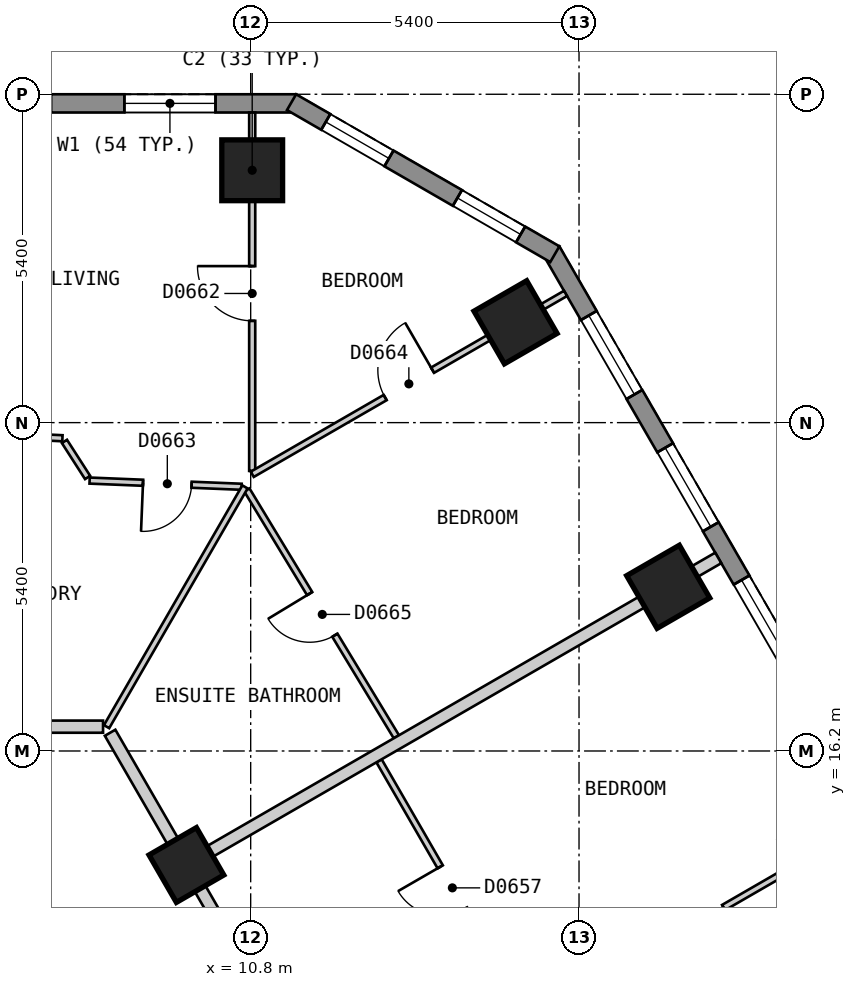
"""IFC4 building model, lengths in metres.
Left out: names, types, materials, properties, quantities, classifications, styles, units other than length and angle.
Written with IfcOpenShell. Run it as: python <this file> out.ifc"""

import sys

from ifc_helpers import new_model, si_unit, direction, frame, frame_2d, origin, origin_2d, place, context, subcontext, project, spatial, polyline, rectangle, outline, extrude, element, fill, save


model = new_model("IFC4")
c1 = context("Model", 3, precision=1e-05, world=origin(), true_north=direction((0.0, 1.0)))
c2 = subcontext(c1, "Body", "Model", "MODEL_VIEW")
j1 = project(units=[si_unit("LENGTHUNIT", "METRE"), si_unit("PLANEANGLEUNIT", "RADIAN")], contexts=[c1])
p1 = place(None, origin())
s1 = spatial("IfcSite", under=j1, at=p1, CompositionType="ELEMENT")
p2 = place(p1, origin())
s2 = spatial("IfcBuilding", under=s1, at=p2, CompositionType="ELEMENT")
p3 = place(p2, frame((0.0, 0.0, 75.0)))
s3 = spatial("IfcBuildingStorey", under=s2, at=p3, CompositionType="ELEMENT", Elevation=75.0)
for number, where, z_axis, x_axis in (
    (1, (10.825, 25.75, 0.0), (0.0, 0.0, 1.0), (-1.0, 0.0, 0.0)),
    (2, (17.667, 18.9, 0.0), (0.0, 0.0, 1.0), (-0.5, 0.866, 0.0)),
    (3, (15.156, 23.25, 0.0), (0.0, 0.0, 1.0), (-0.5, 0.866, 0.0)),
):
    element("IfcColumn", number, at=place(p3, frame(where, z_axis=z_axis, x_axis=x_axis)), inside=s3, PredefinedType="COLUMN", context=c2, shape_type="SweptSolid", body=[
        extrude(rectangle(XDim=1.0, YDim=1.0, at=origin_2d()), origin(), (0.0, 0.0, 1.0), 3.0),
    ])
p4 = place(p3, frame((9.743, 14.325, 0.0), z_axis=(0.0, 0.0, 1.0), x_axis=(-0.5, 0.866025403784, 0.0)))
e4 = element("IfcColumn", 4, at=p4, inside=s3, PredefinedType="COLUMN", context=c2, shape_type="SweptSolid", body=[
    extrude(rectangle(XDim=0.9, YDim=0.9, at=origin_2d()), origin(), (0.0, 0.0, 1.0), 3.0),
])
p5 = place(p3, frame((11.547, 26.85, 0.0), z_axis=(0.0, 0.0, 1.0), x_axis=(-1.0, 0.0, 0.0)))
e5 = element("IfcWall", 5, at=p5, inside=s3, PredefinedType="SOLIDWALL", context=c2, shape_type="SweptSolid", body=[
    extrude(outline(polyline([(0.0, -0.15), (23.094, -0.15), (23.014, 0.15), (0.08, 0.15), (0.0, -0.15)])), origin(), (0.0, 0.0, 1.0), 2.7),
])
p6 = place(p5, frame((1.325, 0.0, 0.15)))
e6 = element("IfcOpeningElement", 6, at=p6, cuts=e5, PredefinedType="OPENING", context=c2, shape_type="SweptSolid", body=[
    extrude(rectangle(XDim=1.5, YDim=2.1, at=frame_2d((0.75, 1.05))), frame((0.0, 0.16, 0.0), z_axis=(0.0, -1.0, 0.0), x_axis=(1.0, 0.0, 0.0)), (0.0, 0.0, 1.0), 0.32),
])
p7 = place(p5, frame((4.032, 0.0, 0.15)))
e7 = element("IfcOpeningElement", 7, at=p7, cuts=e5, PredefinedType="OPENING", context=c2, shape_type="SweptSolid", body=[
    extrude(rectangle(XDim=1.5, YDim=2.1, at=frame_2d((0.75, 1.05))), frame((0.0, 0.16, 0.0), z_axis=(0.0, -1.0, 0.0), x_axis=(1.0, 0.0, 0.0)), (0.0, 0.0, 1.0), 0.32),
])
p8 = place(p5, frame((6.738, 0.0, 0.15)))
e8 = element("IfcOpeningElement", 8, at=p8, cuts=e5, PredefinedType="OPENING", context=c2, shape_type="SweptSolid", body=[
    extrude(rectangle(XDim=1.5, YDim=2.1, at=frame_2d((0.75, 1.05))), frame((0.0, 0.16, 0.0), z_axis=(0.0, -1.0, 0.0), x_axis=(1.0, 0.0, 0.0)), (0.0, 0.0, 1.0), 0.32),
])
p9 = place(p5, frame((9.445, 0.0, 0.15)))
e9 = element("IfcOpeningElement", 9, at=p9, cuts=e5, PredefinedType="OPENING", context=c2, shape_type="SweptSolid", body=[
    extrude(rectangle(XDim=1.5, YDim=2.1, at=frame_2d((0.75, 1.05))), frame((0.0, 0.16, 0.0), z_axis=(0.0, -1.0, 0.0), x_axis=(1.0, 0.0, 0.0)), (0.0, 0.0, 1.0), 0.32),
])
p10 = place(p5, frame((12.151, 0.0, 0.15)))
e10 = element("IfcOpeningElement", 10, at=p10, cuts=e5, PredefinedType="OPENING", context=c2, shape_type="SweptSolid", body=[
    extrude(rectangle(XDim=1.5, YDim=2.1, at=frame_2d((0.75, 1.05))), frame((0.0, 0.16, 0.0), z_axis=(0.0, -1.0, 0.0), x_axis=(1.0, 0.0, 0.0)), (0.0, 0.0, 1.0), 0.32),
])
p11 = place(p5, frame((14.858, 0.0, 0.15)))
e11 = element("IfcOpeningElement", 11, at=p11, cuts=e5, PredefinedType="OPENING", context=c2, shape_type="SweptSolid", body=[
    extrude(rectangle(XDim=1.5, YDim=2.1, at=frame_2d((0.75, 1.05))), frame((0.0, 0.16, 0.0), z_axis=(0.0, -1.0, 0.0), x_axis=(1.0, 0.0, 0.0)), (0.0, 0.0, 1.0), 0.32),
])
p12 = place(p5, frame((17.564, 0.0, 0.15)))
e12 = element("IfcOpeningElement", 12, at=p12, cuts=e5, PredefinedType="OPENING", context=c2, shape_type="SweptSolid", body=[
    extrude(rectangle(XDim=1.5, YDim=2.1, at=frame_2d((0.75, 1.05))), frame((0.0, 0.16, 0.0), z_axis=(0.0, -1.0, 0.0), x_axis=(1.0, 0.0, 0.0)), (0.0, 0.0, 1.0), 0.32),
])
p13 = place(p5, frame((20.271, 0.0, 0.15)))
e13 = element("IfcOpeningElement", 13, at=p13, cuts=e5, PredefinedType="OPENING", context=c2, shape_type="SweptSolid", body=[
    extrude(rectangle(XDim=1.5, YDim=2.1, at=frame_2d((0.75, 1.05))), frame((0.0, 0.16, 0.0), z_axis=(0.0, -1.0, 0.0), x_axis=(1.0, 0.0, 0.0)), (0.0, 0.0, 1.0), 0.32),
])
p14 = place(p3, frame((29.027, 1.425, 0.0), z_axis=(0.0, 0.0, 1.0), x_axis=(-0.500027479704, 0.866009537788, 0.0)))
e14 = element("IfcWall", 14, at=p14, inside=s3, PredefinedType="SOLIDWALL", context=c2, shape_type="SweptSolid", body=[
    extrude(outline(polyline([(0.0, -0.15), (26.559, -0.15), (26.478, 0.15), (0.08, 0.15), (0.0, -0.15)])), origin(), (0.0, 0.0, 1.0), 2.7),
])
p15 = place(p14, frame((1.227, 0.0, 0.15)))
e15 = element("IfcOpeningElement", 15, at=p15, cuts=e14, PredefinedType="OPENING", context=c2, shape_type="SweptSolid", body=[
    extrude(rectangle(XDim=1.5, YDim=2.1, at=frame_2d((0.75, 1.05))), frame((0.0, 0.16, 0.0), z_axis=(0.0, -1.0, 0.0), x_axis=(1.0, 0.0, 0.0)), (0.0, 0.0, 1.0), 0.32),
])
p16 = place(p14, frame((3.738, 0.0, 0.15)))
e16 = element("IfcOpeningElement", 16, at=p16, cuts=e14, PredefinedType="OPENING", context=c2, shape_type="SweptSolid", body=[
    extrude(rectangle(XDim=1.5, YDim=2.1, at=frame_2d((0.75, 1.05))), frame((0.0, 0.16, 0.0), z_axis=(0.0, -1.0, 0.0), x_axis=(1.0, 0.0, 0.0)), (0.0, 0.0, 1.0), 0.32),
])
p17 = place(p14, frame((6.25, 0.0, 0.15)))
e17 = element("IfcOpeningElement", 17, at=p17, cuts=e14, PredefinedType="OPENING", context=c2, shape_type="SweptSolid", body=[
    extrude(rectangle(XDim=1.5, YDim=2.1, at=frame_2d((0.75, 1.05))), frame((0.0, 0.16, 0.0), z_axis=(0.0, -1.0, 0.0), x_axis=(1.0, 0.0, 0.0)), (0.0, 0.0, 1.0), 0.32),
])
p18 = place(p14, frame((8.761, 0.0, 0.15)))
e18 = element("IfcOpeningElement", 18, at=p18, cuts=e14, PredefinedType="OPENING", context=c2, shape_type="SweptSolid", body=[
    extrude(rectangle(XDim=1.5, YDim=2.1, at=frame_2d((0.75, 1.05))), frame((0.0, 0.16, 0.0), z_axis=(0.0, -1.0, 0.0), x_axis=(1.0, 0.0, 0.0)), (0.0, 0.0, 1.0), 0.32),
])
p19 = place(p14, frame((11.273, 0.0, 0.15)))
e19 = element("IfcOpeningElement", 19, at=p19, cuts=e14, PredefinedType="OPENING", context=c2, shape_type="SweptSolid", body=[
    extrude(rectangle(XDim=1.5, YDim=2.1, at=frame_2d((0.75, 1.05))), frame((0.0, 0.16, 0.0), z_axis=(0.0, -1.0, 0.0), x_axis=(1.0, 0.0, 0.0)), (0.0, 0.0, 1.0), 0.32),
])
p20 = place(p14, frame((13.785, 0.0, 0.15)))
e20 = element("IfcOpeningElement", 20, at=p20, cuts=e14, PredefinedType="OPENING", context=c2, shape_type="SweptSolid", body=[
    extrude(rectangle(XDim=1.5, YDim=2.1, at=frame_2d((0.75, 1.05))), frame((0.0, 0.16, 0.0), z_axis=(0.0, -1.0, 0.0), x_axis=(1.0, 0.0, 0.0)), (0.0, 0.0, 1.0), 0.32),
])
p21 = place(p14, frame((16.296, 0.0, 0.15)))
e21 = element("IfcOpeningElement", 21, at=p21, cuts=e14, PredefinedType="OPENING", context=c2, shape_type="SweptSolid", body=[
    extrude(rectangle(XDim=1.5, YDim=2.1, at=frame_2d((0.75, 1.05))), frame((0.0, 0.16, 0.0), z_axis=(0.0, -1.0, 0.0), x_axis=(1.0, 0.0, 0.0)), (0.0, 0.0, 1.0), 0.32),
])
p22 = place(p14, frame((18.807, 0.0, 0.15)))
e22 = element("IfcOpeningElement", 22, at=p22, cuts=e14, PredefinedType="OPENING", context=c2, shape_type="SweptSolid", body=[
    extrude(rectangle(XDim=1.5, YDim=2.1, at=frame_2d((0.75, 1.05))), frame((0.0, 0.16, 0.0), z_axis=(0.0, -1.0, 0.0), x_axis=(1.0, 0.0, 0.0)), (0.0, 0.0, 1.0), 0.32),
])
p23 = place(p14, frame((21.319, 0.0, 0.15)))
e23 = element("IfcOpeningElement", 23, at=p23, cuts=e14, PredefinedType="OPENING", context=c2, shape_type="SweptSolid", body=[
    extrude(rectangle(XDim=1.5, YDim=2.1, at=frame_2d((0.75, 1.05))), frame((0.0, 0.16, 0.0), z_axis=(0.0, -1.0, 0.0), x_axis=(1.0, 0.0, 0.0)), (0.0, 0.0, 1.0), 0.32),
])
p24 = place(p14, frame((23.831, 0.0, 0.15)))
e24 = element("IfcOpeningElement", 24, at=p24, cuts=e14, PredefinedType="OPENING", context=c2, shape_type="SweptSolid", body=[
    extrude(rectangle(XDim=1.5, YDim=2.1, at=frame_2d((0.75, 1.05))), frame((0.0, 0.16, 0.0), z_axis=(0.0, -1.0, 0.0), x_axis=(1.0, 0.0, 0.0)), (0.0, 0.0, 1.0), 0.32),
])
p25 = place(p3, frame((15.802, 24.37, 0.0), z_axis=(0.0, 0.0, 1.0), x_axis=(-0.866022959057, 0.500004234368, 0.0)))
e25 = element("IfcWall", 25, at=p25, inside=s3, PredefinedType="SOLIDWALL", context=c2, shape_type="SweptSolid", body=[
    extrude(outline(polyline([(0.0, -0.15), (5.0, -0.15), (4.92, 0.15), (0.08, 0.15), (0.0, -0.15)])), origin(), (0.0, 0.0, 1.0), 2.7),
])
p26 = place(p25, frame((0.65, 0.0, 0.15)))
e26 = element("IfcOpeningElement", 26, at=p26, cuts=e25, PredefinedType="OPENING", context=c2, shape_type="SweptSolid", body=[
    extrude(rectangle(XDim=1.2, YDim=2.1, at=frame_2d((0.6, 1.05))), frame((0.0, 0.16, 0.0), z_axis=(0.0, -1.0, 0.0), x_axis=(1.0, 0.0, 0.0)), (0.0, 0.0, 1.0), 0.32),
])
p27 = place(p25, frame((3.15, 0.0, 0.15)))
e27 = element("IfcOpeningElement", 27, at=p27, cuts=e25, PredefinedType="OPENING", context=c2, shape_type="SweptSolid", body=[
    extrude(rectangle(XDim=1.2, YDim=2.1, at=frame_2d((0.6, 1.05))), frame((0.0, 0.16, 0.0), z_axis=(0.0, -1.0, 0.0), x_axis=(1.0, 0.0, 0.0)), (0.0, 0.0, 1.0), 0.32),
])
p28 = place(p3, frame((8.488, 16.5, 0.0), z_axis=(0.0, 0.0, 1.0), x_axis=(0.499986836607, -0.86603300354, 0.0)))
e28 = element("IfcWall", 28, at=p28, inside=s3, PredefinedType="PARTITIONING", context=c2, shape_type="SweptSolid", body=[
    extrude(rectangle(XDim=20.09, YDim=0.2, at=frame_2d((10.045, 0.0))), origin(), (0.0, 0.0, 1.0), 2.7),
])
p29 = place(p28, frame((14.569, 0.0, 0.0)))
e29 = element("IfcOpeningElement", 29, at=p29, cuts=e28, PredefinedType="OPENING", context=c2, shape_type="SweptSolid", body=[
    extrude(rectangle(XDim=1.0, YDim=2.1, at=frame_2d((0.5, 1.05))), frame((0.0, 0.11, 0.0), z_axis=(0.0, -1.0, 0.0), x_axis=(1.0, 0.0, 0.0)), (0.0, 0.0, 1.0), 0.22),
])
p30 = place(p3, frame((5.889, 16.6, 0.0), z_axis=(0.0, 0.0, 1.0), x_axis=(1.0, 0.0, 0.0)))
e30 = element("IfcWall", 30, at=p30, inside=s3, PredefinedType="PARTITIONING", context=c2, shape_type="SweptSolid", body=[
    extrude(rectangle(XDim=2.483, YDim=0.2, at=frame_2d((1.242, 0.0))), origin(), (0.0, 0.0, 1.0), 2.7),
])
p31 = place(p3, frame((7.737, 21.291, 0.0), z_axis=(0.0, 0.0, 1.0), x_axis=(0.540389876456, -0.841414749944, 0.0)))
e31 = element("IfcWall", 31, at=p31, inside=s3, PredefinedType="PARTITIONING", context=c2, shape_type="SweptSolid", body=[
    extrude(rectangle(XDim=0.705, YDim=0.1, at=frame_2d((0.353, 0.0))), origin(), (0.0, 0.0, 1.0), 2.7),
])
p32 = place(p3, frame((10.738, 20.492, 0.0), z_axis=(0.0, 0.0, 1.0), x_axis=(0.518100976056, -0.855319459974, 0.0)))
e32 = element("IfcWall", 32, at=p32, inside=s3, PredefinedType="PARTITIONING", context=c2, shape_type="SweptSolid", body=[
    extrude(rectangle(XDim=4.744, YDim=0.1, at=frame_2d((2.372, 0.0))), origin(), (0.0, 0.0, 1.0), 2.7),
])
p33 = place(p32, frame((1.992, 0.0, 0.0)))
e33 = element("IfcOpeningElement", 33, at=p33, cuts=e32, PredefinedType="OPENING", context=c2, shape_type="SweptSolid", body=[
    extrude(rectangle(XDim=0.8, YDim=2.1, at=frame_2d((0.4, 1.05))), frame((0.0, 0.06, 0.0), z_axis=(0.0, -1.0, 0.0), x_axis=(1.0, 0.0, 0.0)), (0.0, 0.0, 1.0), 0.12),
])
p34 = place(p3, frame((12.911, 16.038, 0.0), z_axis=(0.0, 0.0, 1.0), x_axis=(0.499974319101, -0.866040230151, 0.0)))
e34 = element("IfcWall", 34, at=p34, inside=s3, PredefinedType="PARTITIONING", context=c2, shape_type="SweptSolid", body=[
    extrude(rectangle(XDim=4.923, YDim=0.1, at=frame_2d((2.461, 0.0))), origin(), (0.0, 0.0, 1.0), 2.7),
])
p35 = place(p34, frame((2.012, 0.0, 0.0)))
e35 = element("IfcOpeningElement", 35, at=p35, cuts=e34, PredefinedType="OPENING", context=c2, shape_type="SweptSolid", body=[
    extrude(rectangle(XDim=0.8, YDim=2.1, at=frame_2d((0.4, 1.05))), frame((0.0, 0.06, 0.0), z_axis=(0.0, -1.0, 0.0), x_axis=(1.0, 0.0, 0.0)), (0.0, 0.0, 1.0), 0.12),
])
p36 = place(p3, frame((8.151, 20.647, 0.0), z_axis=(0.0, 0.0, 1.0), x_axis=(0.999167241152, -0.040802257405, 0.0)))
e36 = element("IfcWall", 36, at=p36, inside=s3, PredefinedType="PARTITIONING", context=c2, shape_type="SweptSolid", body=[
    extrude(rectangle(XDim=2.501, YDim=0.1, at=frame_2d((1.25, 0.0))), origin(), (0.0, 0.0, 1.0), 2.7),
])
p37 = place(p36, frame((0.879, 0.0, 0.0)))
e37 = element("IfcOpeningElement", 37, at=p37, cuts=e36, PredefinedType="OPENING", context=c2, shape_type="SweptSolid", body=[
    extrude(rectangle(XDim=0.8, YDim=2.1, at=frame_2d((0.4, 1.05))), frame((0.0, 0.06, 0.0), z_axis=(0.0, -1.0, 0.0), x_axis=(1.0, 0.0, 0.0)), (0.0, 0.0, 1.0), 0.12),
])
p38 = place(p3, frame((5.649, 21.441, 0.0), z_axis=(0.0, 0.0, 1.0), x_axis=(0.998867332207, -0.047582062273, 0.0)))
e38 = element("IfcWall", 38, at=p38, inside=s3, PredefinedType="PARTITIONING", context=c2, shape_type="SweptSolid", body=[
    extrude(rectangle(XDim=2.058, YDim=0.1, at=frame_2d((1.029, 0.0))), origin(), (0.0, 0.0, 1.0), 2.7),
])
p39 = place(p3, frame((8.43, 16.6, 0.0), z_axis=(0.0, 0.0, 1.0), x_axis=(0.499951460778, 0.866053426104, 0.0)))
e39 = element("IfcWall", 39, at=p39, inside=s3, PredefinedType="PARTITIONING", context=c2, shape_type="SweptSolid", body=[
    extrude(rectangle(XDim=4.553, YDim=0.1, at=frame_2d((2.276, 0.0))), origin(), (0.0, 0.0, 1.0), 2.7),
])
p40 = place(p3, frame((10.825, 20.806, 0.0), z_axis=(0.0, 0.0, 1.0), x_axis=(0.0, 1.0, 0.0)))
e40 = element("IfcWall", 40, at=p40, inside=s3, PredefinedType="PARTITIONING", context=c2, shape_type="SweptSolid", body=[
    extrude(rectangle(XDim=5.894, YDim=0.1, at=frame_2d((2.947, 0.0))), origin(), (0.0, 0.0, 1.0), 2.7),
])
p41 = place(p40, frame((2.468, 0.0, 0.0)))
e41 = element("IfcOpeningElement", 41, at=p41, cuts=e40, PredefinedType="OPENING", context=c2, shape_type="SweptSolid", body=[
    extrude(rectangle(XDim=0.9, YDim=2.1, at=frame_2d((0.45, 1.05))), frame((0.0, 0.06, 0.0), z_axis=(0.0, -1.0, 0.0), x_axis=(1.0, 0.0, 0.0)), (0.0, 0.0, 1.0), 0.12),
])
p42 = place(p3, frame((10.826, 20.75, 0.0), z_axis=(0.0, 0.0, 1.0), x_axis=(0.865986712877, 0.50006700863, 0.0)))
e42 = element("IfcWall", 42, at=p42, inside=s3, PredefinedType="PARTITIONING", context=c2, shape_type="SweptSolid", body=[
    extrude(rectangle(XDim=5.949, YDim=0.1, at=frame_2d((2.975, 0.0))), origin(), (0.0, 0.0, 1.0), 2.7),
])
p43 = place(p42, frame((2.524, 0.0, 0.0)))
e43 = element("IfcOpeningElement", 43, at=p43, cuts=e42, PredefinedType="OPENING", context=c2, shape_type="SweptSolid", body=[
    extrude(rectangle(XDim=0.9, YDim=2.1, at=frame_2d((0.45, 1.05))), frame((0.0, 0.06, 0.0), z_axis=(0.0, -1.0, 0.0), x_axis=(1.0, 0.0, 0.0)), (0.0, 0.0, 1.0), 0.12),
])
p44 = place(p3, frame((12.342, 10.025, 0.0), z_axis=(0.0, 0.0, 1.0), x_axis=(0.865992435864, 0.500057097767, 0.0)))
e44 = element("IfcWall", 44, at=p44, inside=s3, PredefinedType="PARTITIONING", context=c2, shape_type="SweptSolid", body=[
    extrude(rectangle(XDim=9.999, YDim=0.1, at=frame_2d((5.0, 0.0))), origin(), (0.0, 0.0, 1.0), 2.7),
])
p45 = place(p44, frame((6.3, 0.0, 0.0)))
e45 = element("IfcOpeningElement", 45, at=p45, cuts=e44, PredefinedType="OPENING", context=c2, shape_type="SweptSolid", body=[
    extrude(rectangle(XDim=0.9, YDim=2.1, at=frame_2d((0.45, 1.05))), frame((0.0, 0.06, 0.0), z_axis=(0.0, -1.0, 0.0), x_axis=(1.0, 0.0, 0.0)), (0.0, 0.0, 1.0), 0.12),
])
p46 = place(p3, frame((9.83, 14.375, 0.0), z_axis=(0.0, 0.0, 1.0), x_axis=(0.866016855193, 0.500014806302, 0.0)))
e46 = element("IfcWall", 46, at=p46, inside=s3, PredefinedType="PARTITIONING", context=c2, shape_type="SweptSolid", body=[
    extrude(rectangle(XDim=10.0, YDim=0.2, at=frame_2d((5.0, 0.0))), origin(), (0.0, 0.0, 1.0), 2.7),
])
p47 = place(p6, origin())
e47 = element("IfcWindow", 47, at=p47, inside=s3, PartitioningType="SINGLE_PANEL", PredefinedType="WINDOW", context=c2, shape_type="SweptSolid", body=[
    extrude(rectangle(XDim=1.5, YDim=2.1, at=frame_2d((0.75, 1.05))), frame((0.0, 0.03, 0.0), z_axis=(0.0, -1.0, 0.0), x_axis=(1.0, 0.0, 0.0)), (0.0, 0.0, 1.0), 0.06),
])
fill(e6, e47)
p48 = place(p22, origin())
e48 = element("IfcWindow", 48, at=p48, inside=s3, PartitioningType="SINGLE_PANEL", PredefinedType="WINDOW", context=c2, shape_type="SweptSolid", body=[
    extrude(rectangle(XDim=1.5, YDim=2.1, at=frame_2d((0.75, 1.05))), frame((0.0, 0.03, 0.0), z_axis=(0.0, -1.0, 0.0), x_axis=(1.0, 0.0, 0.0)), (0.0, 0.0, 1.0), 0.06),
])
fill(e22, e48)
p49 = place(p23, origin())
e49 = element("IfcWindow", 49, at=p49, inside=s3, PartitioningType="SINGLE_PANEL", PredefinedType="WINDOW", context=c2, shape_type="SweptSolid", body=[
    extrude(rectangle(XDim=1.5, YDim=2.1, at=frame_2d((0.75, 1.05))), frame((0.0, 0.03, 0.0), z_axis=(0.0, -1.0, 0.0), x_axis=(1.0, 0.0, 0.0)), (0.0, 0.0, 1.0), 0.06),
])
fill(e23, e49)
p50 = place(p24, origin())
e50 = element("IfcWindow", 50, at=p50, inside=s3, PartitioningType="SINGLE_PANEL", PredefinedType="WINDOW", context=c2, shape_type="SweptSolid", body=[
    extrude(rectangle(XDim=1.5, YDim=2.1, at=frame_2d((0.75, 1.05))), frame((0.0, 0.03, 0.0), z_axis=(0.0, -1.0, 0.0), x_axis=(1.0, 0.0, 0.0)), (0.0, 0.0, 1.0), 0.06),
])
fill(e24, e50)
p51 = place(p26, origin())
e51 = element("IfcWindow", 51, at=p51, inside=s3, PartitioningType="SINGLE_PANEL", PredefinedType="WINDOW", context=c2, shape_type="SweptSolid", body=[
    extrude(rectangle(XDim=1.2, YDim=2.1, at=frame_2d((0.6, 1.05))), frame((0.0, 0.03, 0.0), z_axis=(0.0, -1.0, 0.0), x_axis=(1.0, 0.0, 0.0)), (0.0, 0.0, 1.0), 0.06),
])
fill(e26, e51)
p52 = place(p27, origin())
e52 = element("IfcWindow", 52, at=p52, inside=s3, PartitioningType="SINGLE_PANEL", PredefinedType="WINDOW", context=c2, shape_type="SweptSolid", body=[
    extrude(rectangle(XDim=1.2, YDim=2.1, at=frame_2d((0.6, 1.05))), frame((0.0, 0.03, 0.0), z_axis=(0.0, -1.0, 0.0), x_axis=(1.0, 0.0, 0.0)), (0.0, 0.0, 1.0), 0.06),
])
fill(e27, e52)
p53 = place(p45, origin())
e53 = element("IfcDoor", 53, at=p53, inside=s3, OperationType="SINGLE_SWING_RIGHT", PredefinedType="DOOR", context=c2, shape_type="SweptSolid", body=[
    extrude(rectangle(XDim=0.9, YDim=2.1, at=frame_2d((0.45, 1.05))), frame((0.0, 0.025, 0.0), z_axis=(0.0, -1.0, 0.0), x_axis=(1.0, 0.0, 0.0)), (0.0, 0.0, 1.0), 0.05),
])
fill(e45, e53)
p54 = place(p35, origin())
e54 = element("IfcDoor", 54, at=p54, inside=s3, OperationType="SINGLE_SWING_LEFT", PredefinedType="DOOR", context=c2, shape_type="SweptSolid", body=[
    extrude(rectangle(XDim=0.8, YDim=2.1, at=frame_2d((0.4, 1.05))), frame((0.0, 0.025, 0.0), z_axis=(0.0, -1.0, 0.0), x_axis=(1.0, 0.0, 0.0)), (0.0, 0.0, 1.0), 0.05),
])
fill(e35, e54)
p55 = place(p41, origin())
e55 = element("IfcDoor", 55, at=p55, inside=s3, OperationType="SINGLE_SWING_RIGHT", PredefinedType="DOOR", context=c2, shape_type="SweptSolid", body=[
    extrude(rectangle(XDim=0.9, YDim=2.1, at=frame_2d((0.45, 1.05))), frame((0.0, 0.025, 0.0), z_axis=(0.0, -1.0, 0.0), x_axis=(1.0, 0.0, 0.0)), (0.0, 0.0, 1.0), 0.05),
])
fill(e41, e55)
p56 = place(p37, origin())
e56 = element("IfcDoor", 56, at=p56, inside=s3, OperationType="SINGLE_SWING_LEFT", PredefinedType="DOOR", context=c2, shape_type="SweptSolid", body=[
    extrude(rectangle(XDim=0.8, YDim=2.1, at=frame_2d((0.4, 1.05))), frame((0.0, 0.025, 0.0), z_axis=(0.0, -1.0, 0.0), x_axis=(1.0, 0.0, 0.0)), (0.0, 0.0, 1.0), 0.05),
])
fill(e37, e56)
p57 = place(p43, origin())
e57 = element("IfcDoor", 57, at=p57, inside=s3, OperationType="SINGLE_SWING_RIGHT", PredefinedType="DOOR", context=c2, shape_type="SweptSolid", body=[
    extrude(rectangle(XDim=0.9, YDim=2.1, at=frame_2d((0.45, 1.05))), frame((0.0, 0.025, 0.0), z_axis=(0.0, -1.0, 0.0), x_axis=(1.0, 0.0, 0.0)), (0.0, 0.0, 1.0), 0.05),
])
fill(e43, e57)
p58 = place(p33, origin())
e58 = element("IfcDoor", 58, at=p58, inside=s3, OperationType="SINGLE_SWING_LEFT", PredefinedType="DOOR", context=c2, shape_type="SweptSolid", body=[
    extrude(rectangle(XDim=0.8, YDim=2.1, at=frame_2d((0.4, 1.05))), frame((0.0, 0.025, 0.0), z_axis=(0.0, -1.0, 0.0), x_axis=(1.0, 0.0, 0.0)), (0.0, 0.0, 1.0), 0.05),
])
fill(e33, e58)
save(model, sys.argv[1])
